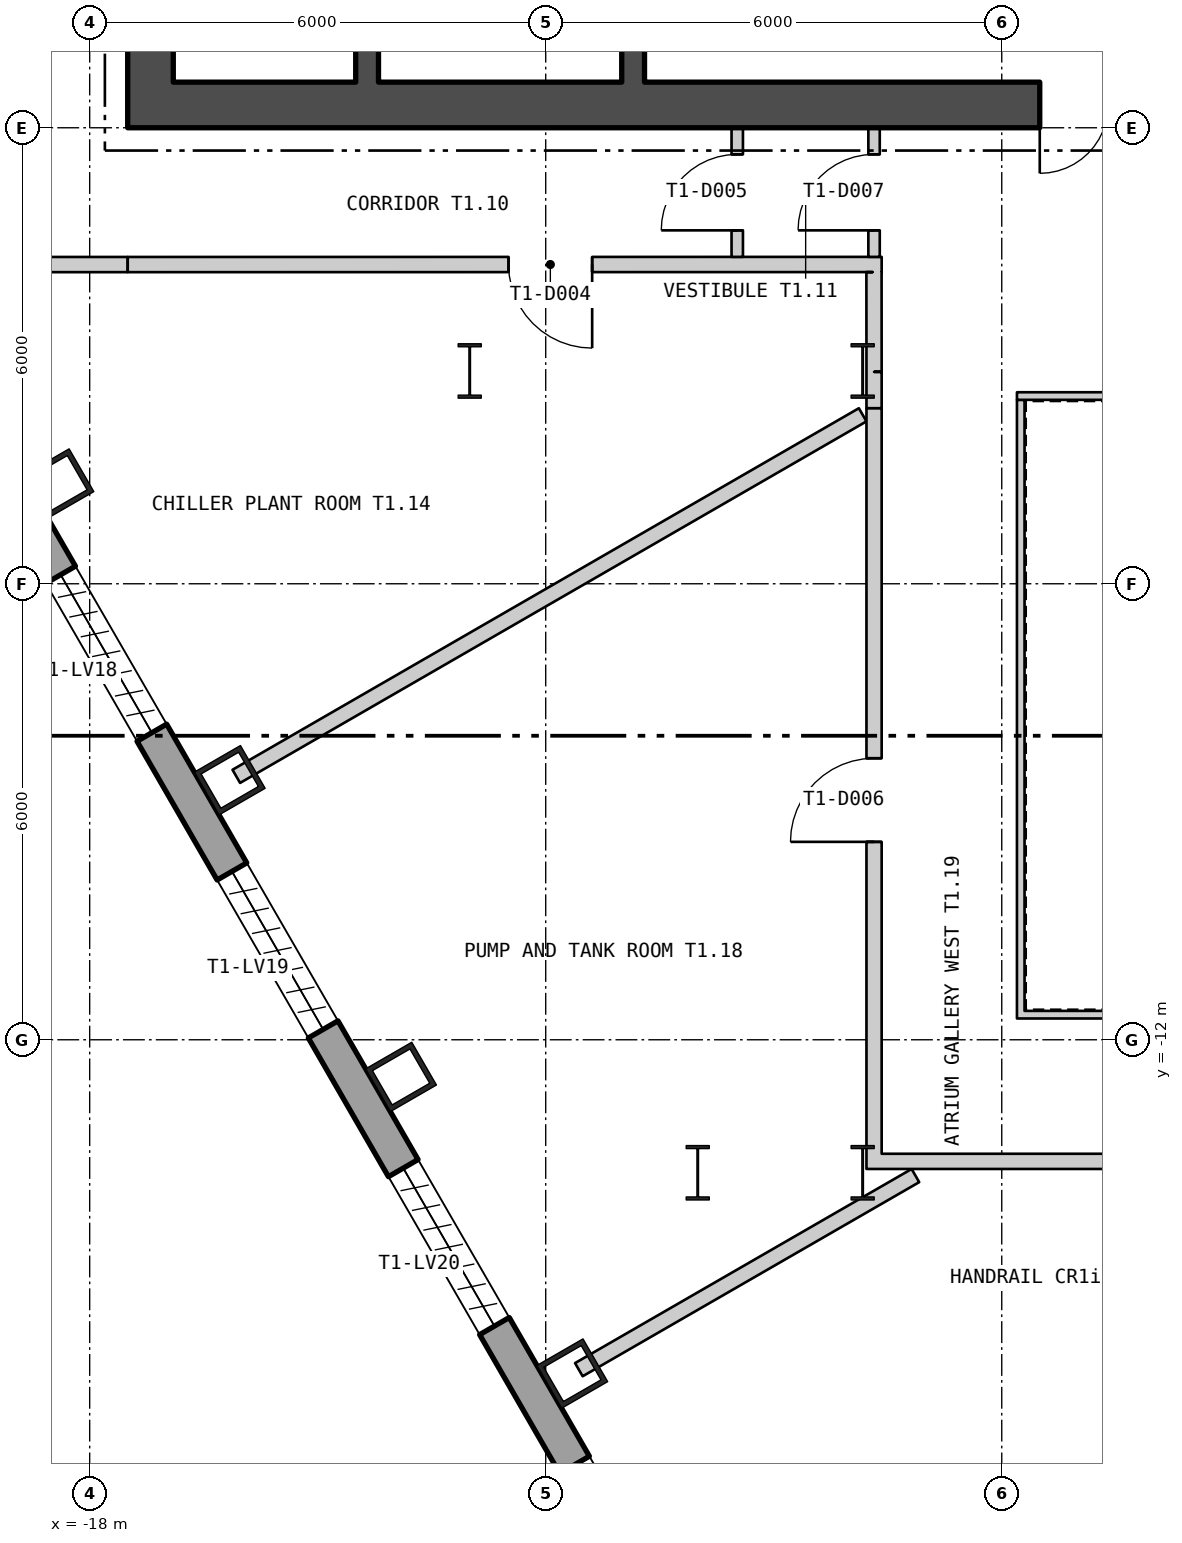
"""IFC4 building model, lengths in metres.
Left out: names, types, materials, properties, quantities, classifications, styles, units other than length and angle.
Written with IfcOpenShell. Run it as: python <this file> out.ifc"""

import sys

from ifc_helpers import new_model, si_unit, direction, frame, frame_2d, origin, origin_2d, place, context, subcontext, project, spatial, polyline, rectangle, hollow_rectangle, i_section, outline, extrude, element, fill, save


model = new_model("IFC4")
c1 = context("Model", 3, precision=1e-05, world=origin(), true_north=direction((0.0, 1.0)))
c2 = subcontext(c1, "Body", "Model", "MODEL_VIEW")
j1 = project(units=[si_unit("LENGTHUNIT", "METRE"), si_unit("PLANEANGLEUNIT", "RADIAN")], contexts=[c1])
p1 = place(None, origin())
s1 = spatial("IfcSite", under=j1, at=p1, CompositionType="ELEMENT")
p2 = place(p1, origin())
s2 = spatial("IfcBuilding", under=s1, at=p2, CompositionType="ELEMENT")
p3 = place(p2, frame((0.0, 0.0, 78.3)))
s3 = spatial("IfcBuildingStorey", under=s2, at=p3, CompositionType="ELEMENT", Elevation=78.3)
for number, where, z_axis, x_axis in (
    (1, (-18.411, -4.681, 0.0), (0.0, 0.0, 1.0), (0.5, -0.866, 0.0)),
    (2, (-16.157, -8.585, 0.0), (0.0, 0.0, 1.0), (0.5, -0.866, 0.0)),
    (3, (-13.903, -12.489, 0.0), (0.0, 0.0, 1.0), (0.5, -0.866, 0.0)),
    (4, (-11.65, -16.392, 0.0), (0.0, 0.0, 1.0), (0.5, -0.866, 0.0)),
):
    element("IfcColumn", number, at=place(p3, frame(where, z_axis=z_axis, x_axis=x_axis)), inside=s3, PredefinedType="COLUMN", context=c2, shape_type="SweptSolid", body=[
        extrude(hollow_rectangle(XDim=0.65, YDim=0.7, WallThickness=0.065, at=origin_2d()), origin(), (0.0, 0.0, 1.0), 6.0),
    ])
for number, where, z_axis, x_axis in (
    (5, (-7.83, -3.2, 0.0), (0.0, 0.0, 1.0), (1.0, 0.0, 0.0)),
    (6, (-7.83, -13.75, 0.0), (0.0, 0.0, 1.0), (1.0, 0.0, 0.0)),
    (7, (-13.0, -3.2, 0.0), (0.0, 0.0, 1.0), (1.0, 0.0, 0.0)),
    (8, (-10.0, -13.75, 0.0), (0.0, 0.0, 1.0), (1.0, 0.0, 0.0)),
):
    element("IfcColumn", number, at=place(p3, frame(where, z_axis=z_axis, x_axis=x_axis)), inside=s3, PredefinedType="COLUMN", context=c2, shape_type="SweptSolid", body=[
        extrude(i_section(OverallWidth=0.304, OverallDepth=0.716, WebThickness=0.021, FlangeThickness=0.04, at=origin_2d()), origin(), (0.0, 0.0, 1.0), 6.0),
    ])
p4 = place(p3, frame((-28.09, 10.934, -0.18), z_axis=(0.0, 0.0, 1.0), x_axis=(0.500000711659, -0.866024992908, 0.0)))
e9 = element("IfcWall", 9, at=p4, inside=s3, PredefinedType="SOLIDWALL", context=c2, shape_type="SweptSolid", body=[
    extrude(outline(polyline([(-0.13, -0.225), (45.87, -0.225), (45.61, 0.225), (0.13, 0.225), (-0.13, -0.225)])), origin(), (0.0, 0.0, 1.0), 6.0),
])
p5 = place(p4, frame((1.424, 0.0, 1.38)))
e10 = element("IfcOpeningElement", 10, at=p5, cuts=e9, PredefinedType="OPENING", context=c2, shape_type="SweptSolid", body=[
    extrude(rectangle(XDim=2.4, YDim=3.6, at=frame_2d((1.2, 1.8))), frame((0.0, 0.235, 0.0), z_axis=(0.0, -1.0, 0.0), x_axis=(1.0, 0.0, 0.0)), (0.0, 0.0, 1.0), 0.47),
])
p6 = place(p4, frame((5.893, 0.0, 1.38)))
e11 = element("IfcOpeningElement", 11, at=p6, cuts=e9, PredefinedType="OPENING", context=c2, shape_type="SweptSolid", body=[
    extrude(rectangle(XDim=2.4, YDim=3.6, at=frame_2d((1.2, 1.8))), frame((0.0, 0.235, 0.0), z_axis=(0.0, -1.0, 0.0), x_axis=(1.0, 0.0, 0.0)), (0.0, 0.0, 1.0), 0.47),
])
p7 = place(p4, frame((10.401, 0.0, 1.38)))
e12 = element("IfcOpeningElement", 12, at=p7, cuts=e9, PredefinedType="OPENING", context=c2, shape_type="SweptSolid", body=[
    extrude(rectangle(XDim=2.4, YDim=3.6, at=frame_2d((1.2, 1.8))), frame((0.0, 0.235, 0.0), z_axis=(0.0, -1.0, 0.0), x_axis=(1.0, 0.0, 0.0)), (0.0, 0.0, 1.0), 0.47),
])
p8 = place(p4, frame((14.909, 0.0, 1.38)))
e13 = element("IfcOpeningElement", 13, at=p8, cuts=e9, PredefinedType="OPENING", context=c2, shape_type="SweptSolid", body=[
    extrude(rectangle(XDim=2.4, YDim=3.6, at=frame_2d((1.2, 1.8))), frame((0.0, 0.235, 0.0), z_axis=(0.0, -1.0, 0.0), x_axis=(1.0, 0.0, 0.0)), (0.0, 0.0, 1.0), 0.47),
])
p9 = place(p4, frame((19.416, 0.0, 1.38)))
e14 = element("IfcOpeningElement", 14, at=p9, cuts=e9, PredefinedType="OPENING", context=c2, shape_type="SweptSolid", body=[
    extrude(rectangle(XDim=2.4, YDim=3.6, at=frame_2d((1.2, 1.8))), frame((0.0, 0.235, 0.0), z_axis=(0.0, -1.0, 0.0), x_axis=(1.0, 0.0, 0.0)), (0.0, 0.0, 1.0), 0.47),
])
p10 = place(p4, frame((23.924, 0.0, 1.38)))
e15 = element("IfcOpeningElement", 15, at=p10, cuts=e9, PredefinedType="OPENING", context=c2, shape_type="SweptSolid", body=[
    extrude(rectangle(XDim=2.4, YDim=3.6, at=frame_2d((1.2, 1.8))), frame((0.0, 0.235, 0.0), z_axis=(0.0, -1.0, 0.0), x_axis=(1.0, 0.0, 0.0)), (0.0, 0.0, 1.0), 0.47),
])
p11 = place(p4, frame((28.431, 0.0, 1.38)))
e16 = element("IfcOpeningElement", 16, at=p11, cuts=e9, PredefinedType="OPENING", context=c2, shape_type="SweptSolid", body=[
    extrude(rectangle(XDim=2.4, YDim=3.6, at=frame_2d((1.2, 1.8))), frame((0.0, 0.235, 0.0), z_axis=(0.0, -1.0, 0.0), x_axis=(1.0, 0.0, 0.0)), (0.0, 0.0, 1.0), 0.47),
])
p12 = place(p4, frame((32.939, 0.0, 1.38)))
e17 = element("IfcOpeningElement", 17, at=p12, cuts=e9, PredefinedType="OPENING", context=c2, shape_type="SweptSolid", body=[
    extrude(rectangle(XDim=2.4, YDim=3.6, at=frame_2d((1.2, 1.8))), frame((0.0, 0.235, 0.0), z_axis=(0.0, -1.0, 0.0), x_axis=(1.0, 0.0, 0.0)), (0.0, 0.0, 1.0), 0.47),
])
p13 = place(p4, frame((37.447, 0.0, 1.38)))
e18 = element("IfcOpeningElement", 18, at=p13, cuts=e9, PredefinedType="OPENING", context=c2, shape_type="SweptSolid", body=[
    extrude(rectangle(XDim=2.4, YDim=3.6, at=frame_2d((1.2, 1.8))), frame((0.0, 0.235, 0.0), z_axis=(0.0, -1.0, 0.0), x_axis=(1.0, 0.0, 0.0)), (0.0, 0.0, 1.0), 0.47),
])
p14 = place(p4, frame((41.916, 0.0, 1.38)))
e19 = element("IfcOpeningElement", 19, at=p14, cuts=e9, PredefinedType="OPENING", context=c2, shape_type="SweptSolid", body=[
    extrude(rectangle(XDim=2.4, YDim=3.6, at=frame_2d((1.2, 1.8))), frame((0.0, 0.235, 0.0), z_axis=(0.0, -1.0, 0.0), x_axis=(1.0, 0.0, 0.0)), (0.0, 0.0, 1.0), 0.47),
])
for number, where, z_axis, x_axis in (
    (20, (-5.8, -11.67, 0.0), (0.0, 0.0, 1.0), (1.0, 0.0, 0.0)),
    (21, (5.8, -3.53, 0.0), (0.0, 0.0, 1.0), (-1.0, 0.0, 0.0)),
):
    element("IfcWall", number, at=place(p3, frame(where, z_axis=z_axis, x_axis=x_axis)), inside=s3, PredefinedType="PARTITIONING", context=c2, shape_type="SweptSolid", body=[
        extrude(rectangle(XDim=11.6, YDim=0.1, at=frame_2d((5.8, 0.0))), origin(), (0.0, 0.0, 1.0), 5.8),
    ])
p15 = place(p3, frame((-5.75, -3.58, 0.0), z_axis=(0.0, 0.0, 1.0), x_axis=(0.0, -1.0, 0.0)))
e22 = element("IfcWall", 22, at=p15, inside=s3, PredefinedType="PARTITIONING", context=c2, shape_type="SweptSolid", body=[
    extrude(rectangle(XDim=8.04, YDim=0.1, at=frame_2d((4.02, 0.0))), origin(), (0.0, 0.0, 1.0), 5.8),
])
p16 = place(p3, frame((-17.5, 0.3, 0.0), z_axis=(0.0, 0.0, 1.0), x_axis=(1.0, 0.0, 0.0)))
e23 = element("IfcWall", 23, at=p16, inside=s3, PredefinedType="SHEAR", context=c2, shape_type="SweptSolid", body=[
    extrude(rectangle(XDim=35.0, YDim=0.6, at=frame_2d((17.5, 0.0))), origin(), (0.0, 0.0, 1.0), 5.8),
])
p17 = place(p16, frame((12.0, 0.0, 0.0)))
e24 = element("IfcOpeningElement", 24, at=p17, cuts=e23, PredefinedType="OPENING", context=c2, shape_type="SweptSolid", body=[
    extrude(rectangle(XDim=1.8, YDim=2.4, at=frame_2d((0.9, 1.2))), frame((0.0, 0.31, 0.0), z_axis=(0.0, -1.0, 0.0), x_axis=(1.0, 0.0, 0.0)), (0.0, 0.0, 1.0), 0.62),
])
p18 = place(p16, frame((22.0, 0.0, 0.0)))
e25 = element("IfcOpeningElement", 25, at=p18, cuts=e23, PredefinedType="OPENING", context=c2, shape_type="SweptSolid", body=[
    extrude(rectangle(XDim=1.8, YDim=2.4, at=frame_2d((0.9, 1.2))), frame((0.0, 0.31, 0.0), z_axis=(0.0, -1.0, 0.0), x_axis=(1.0, 0.0, 0.0)), (0.0, 0.0, 1.0), 0.62),
])
p19 = place(p3, frame((-17.2, 0.6, 0.0), z_axis=(0.0, 0.0, 1.0), x_axis=(0.0, 1.0, 0.0)))
e26 = element("IfcWall", 26, at=p19, inside=s3, PredefinedType="SHEAR", context=c2, shape_type="SweptSolid", body=[
    extrude(rectangle(XDim=16.8, YDim=0.6, at=frame_2d((8.4, 0.0))), origin(), (0.0, 0.0, 1.0), 5.8),
])
p20 = place(p19, frame((5.7, 0.0, 0.0)))
e27 = element("IfcOpeningElement", 27, at=p20, cuts=e26, PredefinedType="OPENING", context=c2, shape_type="SweptSolid", body=[
    extrude(rectangle(XDim=1.5, YDim=2.1, at=frame_2d((0.75, 1.05))), frame((0.0, 0.31, 0.0), z_axis=(0.0, -1.0, 0.0), x_axis=(1.0, 0.0, 0.0)), (0.0, 0.0, 1.0), 0.62),
])
p21 = place(p19, frame((0.571, 0.0, 0.0)))
e28 = element("IfcOpeningElement", 28, at=p21, cuts=e26, PredefinedType="OPENING", context=c2, shape_type="SweptSolid", body=[
    extrude(rectangle(XDim=0.9, YDim=2.1, at=frame_2d((0.45, 1.05))), frame((0.0, 0.31, 0.0), z_axis=(0.0, -1.0, 0.0), x_axis=(1.0, 0.0, 0.0)), (0.0, 0.0, 1.0), 0.62),
])
p22 = place(p19, frame((3.421, 0.0, 0.0)))
e29 = element("IfcOpeningElement", 29, at=p22, cuts=e26, PredefinedType="OPENING", context=c2, shape_type="SweptSolid", body=[
    extrude(rectangle(XDim=0.9, YDim=2.1, at=frame_2d((0.45, 1.05))), frame((0.0, 0.31, 0.0), z_axis=(0.0, -1.0, 0.0), x_axis=(1.0, 0.0, 0.0)), (0.0, 0.0, 1.0), 0.62),
])
p23 = place(p19, frame((9.473, 0.0, 0.0)))
e30 = element("IfcOpeningElement", 30, at=p23, cuts=e26, PredefinedType="OPENING", context=c2, shape_type="SweptSolid", body=[
    extrude(rectangle(XDim=1.0, YDim=2.1, at=frame_2d((0.5, 1.05))), frame((0.0, 0.31, 0.0), z_axis=(0.0, -1.0, 0.0), x_axis=(1.0, 0.0, 0.0)), (0.0, 0.0, 1.0), 0.62),
])
p24 = place(p19, frame((14.323, 0.0, 0.0)))
e31 = element("IfcOpeningElement", 31, at=p24, cuts=e26, PredefinedType="OPENING", context=c2, shape_type="SweptSolid", body=[
    extrude(rectangle(XDim=0.9, YDim=2.1, at=frame_2d((0.45, 1.05))), frame((0.0, 0.31, 0.0), z_axis=(0.0, -1.0, 0.0), x_axis=(1.0, 0.0, 0.0)), (0.0, 0.0, 1.0), 0.62),
])
p25 = place(p3, frame((-10.85, 0.6, 0.0), z_axis=(0.0, 0.0, 1.0), x_axis=(0.0, 1.0, 0.0)))
e32 = element("IfcWall", 32, at=p25, inside=s3, PredefinedType="SHEAR", context=c2, shape_type="SweptSolid", body=[
    extrude(rectangle(XDim=16.8, YDim=0.3, at=frame_2d((8.4, 0.0))), origin(), (0.0, 0.0, 1.0), 5.8),
])
p26 = place(p25, frame((5.075, 0.0, 0.0)))
e33 = element("IfcOpeningElement", 33, at=p26, cuts=e32, PredefinedType="OPENING", context=c2, shape_type="SweptSolid", body=[
    extrude(rectangle(XDim=1.25, YDim=2.1, at=frame_2d((0.625, 1.05))), frame((0.0, 0.16, 0.0), z_axis=(0.0, -1.0, 0.0), x_axis=(1.0, 0.0, 0.0)), (0.0, 0.0, 1.0), 0.32),
])
p27 = place(p25, frame((1.525, 0.0, 0.0)))
e34 = element("IfcOpeningElement", 34, at=p27, cuts=e32, PredefinedType="OPENING", context=c2, shape_type="SweptSolid", body=[
    extrude(rectangle(XDim=1.0, YDim=2.1, at=frame_2d((0.5, 1.05))), frame((0.0, 0.16, 0.0), z_axis=(0.0, -1.0, 0.0), x_axis=(1.0, 0.0, 0.0)), (0.0, 0.0, 1.0), 0.32),
])
p28 = place(p3, frame((-14.35, 0.6, 0.0), z_axis=(0.0, 0.0, 1.0), x_axis=(0.0, 1.0, 0.0)))
e35 = element("IfcWall", 35, at=p28, inside=s3, PredefinedType="SHEAR", context=c2, shape_type="SweptSolid", body=[
    extrude(rectangle(XDim=16.8, YDim=0.3, at=frame_2d((8.4, 0.0))), origin(), (0.0, 0.0, 1.0), 5.8),
])
p29 = place(p28, frame((5.7, 0.0, 0.0)))
e36 = element("IfcOpeningElement", 36, at=p29, cuts=e35, PredefinedType="OPENING", context=c2, shape_type="SweptSolid", body=[
    extrude(rectangle(XDim=1.5, YDim=2.1, at=frame_2d((0.75, 1.05))), frame((0.0, 0.16, 0.0), z_axis=(0.0, -1.0, 0.0), x_axis=(1.0, 0.0, 0.0)), (0.0, 0.0, 1.0), 0.32),
])
p30 = place(p3, frame((-19.2, -1.8, 0.0), z_axis=(0.0, 0.0, 1.0), x_axis=(1.0, 0.0, 0.0)))
e37 = element("IfcWall", 37, at=p30, inside=s3, PredefinedType="PARTITIONING", context=c2, shape_type="SweptSolid", body=[
    extrude(rectangle(XDim=1.699, YDim=0.2, at=frame_2d((0.85, 0.0))), origin(), (0.0, 0.0, 1.0), 5.8),
])
p31 = place(p3, frame((-17.499, -1.8, 0.0), z_axis=(0.0, 0.0, 1.0), x_axis=(0.999999994918, 0.000100816614, 0.0)))
e38 = element("IfcWall", 38, at=p31, inside=s3, PredefinedType="PARTITIONING", context=c2, shape_type="SweptSolid", body=[
    extrude(rectangle(XDim=9.919, YDim=0.2, at=frame_2d((4.96, 0.0))), origin(), (0.0, 0.0, 1.0), 5.8),
])
p32 = place(p31, frame((5.01, 0.0, 0.0)))
e39 = element("IfcOpeningElement", 39, at=p32, cuts=e38, PredefinedType="OPENING", context=c2, shape_type="SweptSolid", body=[
    extrude(rectangle(XDim=1.1, YDim=2.1, at=frame_2d((0.55, 1.05))), frame((0.0, 0.11, 0.0), z_axis=(0.0, -1.0, 0.0), x_axis=(1.0, 0.0, 0.0)), (0.0, 0.0, 1.0), 0.22),
])
p33 = place(p3, frame((-16.071, -8.534, 0.0), z_axis=(0.0, 0.0, 1.0), x_axis=(0.866068339032, 0.499925626596, 0.0)))
e40 = element("IfcWall", 40, at=p33, inside=s3, PredefinedType="PARTITIONING", context=c2, shape_type="SweptSolid", body=[
    extrude(rectangle(XDim=9.515, YDim=0.2, at=frame_2d((4.758, 0.0))), origin(), (0.0, 0.0, 1.0), 5.8),
])
p34 = place(p3, frame((-11.564, -16.341, 0.0), z_axis=(0.0, 0.0, 1.0), x_axis=(0.86623769072, 0.499632127845, 0.0)))
e41 = element("IfcWall", 41, at=p34, inside=s3, PredefinedType="PARTITIONING", context=c2, shape_type="SweptSolid", body=[
    extrude(rectangle(XDim=5.112, YDim=0.2, at=frame_2d((2.556, 0.0))), origin(), (0.0, 0.0, 1.0), 5.8),
])
p35 = place(p3, frame((-9.48, -1.699, 0.0), z_axis=(0.0, 0.0, 1.0), x_axis=(0.0, 1.0, 0.0)))
e42 = element("IfcWall", 42, at=p35, inside=s3, PredefinedType="PARTITIONING", context=c2, shape_type="SweptSolid", body=[
    extrude(rectangle(XDim=1.698, YDim=0.15, at=frame_2d((0.849, 0.0))), origin(), (0.0, 0.0, 1.0), 5.2),
])
p36 = place(p35, frame((0.349, 0.0, 0.0)))
e43 = element("IfcOpeningElement", 43, at=p36, cuts=e42, PredefinedType="OPENING", context=c2, shape_type="SweptSolid", body=[
    extrude(rectangle(XDim=1.0, YDim=2.1, at=frame_2d((0.5, 1.05))), frame((0.0, 0.085, 0.0), z_axis=(0.0, -1.0, 0.0), x_axis=(1.0, 0.0, 0.0)), (0.0, 0.0, 1.0), 0.17),
])
p37 = place(p3, frame((-7.681, -1.899, 0.0), z_axis=(0.0, 0.0, 1.0), x_axis=(0.000761614402, -0.999999709972, 0.0)))
e44 = element("IfcWall", 44, at=p37, inside=s3, PredefinedType="PARTITIONING", context=c2, shape_type="SweptSolid", body=[
    extrude(rectangle(XDim=1.313, YDim=0.2, at=frame_2d((0.656, 0.0))), origin(), (0.0, 0.0, 1.0), 5.8),
])
p38 = place(p3, frame((-7.68, -13.7, 0.0), z_axis=(0.0, 0.0, 1.0), x_axis=(0.0, 1.0, 0.0)))
e45 = element("IfcWall", 45, at=p38, inside=s3, PredefinedType="PARTITIONING", context=c2, shape_type="SweptSolid", body=[
    extrude(rectangle(XDim=10.008, YDim=0.2, at=frame_2d((5.004, 0.0))), origin(), (0.0, 0.0, 1.0), 5.2),
])
p39 = place(p38, frame((4.304, 0.0, 0.0)))
e46 = element("IfcOpeningElement", 46, at=p39, cuts=e45, PredefinedType="OPENING", context=c2, shape_type="SweptSolid", body=[
    extrude(rectangle(XDim=1.1, YDim=2.1, at=frame_2d((0.55, 1.05))), frame((0.0, 0.11, 0.0), z_axis=(0.0, -1.0, 0.0), x_axis=(1.0, 0.0, 0.0)), (0.0, 0.0, 1.0), 0.22),
])
p40 = place(p3, frame((-7.68, -3.69, 0.0), z_axis=(0.0, 0.0, 1.0), x_axis=(0.0, 1.0, 0.0)))
e47 = element("IfcWall", 47, at=p40, inside=s3, PredefinedType="PARTITIONING", context=c2, shape_type="SweptSolid", body=[
    extrude(rectangle(XDim=0.478, YDim=0.2, at=frame_2d((0.239, 0.0))), origin(), (0.0, 0.0, 1.0), 5.2),
])
p41 = place(p3, frame((-7.68, -1.699, 0.0), z_axis=(0.0, 0.0, 1.0), x_axis=(0.0, 1.0, 0.0)))
e48 = element("IfcWall", 48, at=p41, inside=s3, PredefinedType="PARTITIONING", context=c2, shape_type="SweptSolid", body=[
    extrude(rectangle(XDim=1.698, YDim=0.15, at=frame_2d((0.849, 0.0))), origin(), (0.0, 0.0, 1.0), 5.8),
])
p42 = place(p41, frame((0.349, 0.0, 0.0)))
e49 = element("IfcOpeningElement", 49, at=p42, cuts=e48, PredefinedType="OPENING", context=c2, shape_type="SweptSolid", body=[
    extrude(rectangle(XDim=1.0, YDim=2.1, at=frame_2d((0.5, 1.05))), frame((0.0, 0.085, 0.0), z_axis=(0.0, -1.0, 0.0), x_axis=(1.0, 0.0, 0.0)), (0.0, 0.0, 1.0), 0.17),
])
p43 = place(p3, frame((-7.58, -13.6, 0.0), z_axis=(0.0, 0.0, 1.0), x_axis=(1.0, 0.0, 0.0)))
e50 = element("IfcWall", 50, at=p43, inside=s3, PredefinedType="PARTITIONING", context=c2, shape_type="SweptSolid", body=[
    extrude(rectangle(XDim=5.88, YDim=0.2, at=frame_2d((2.94, 0.0))), origin(), (0.0, 0.0, 1.0), 4.89),
])
p44 = place(p43, frame((3.309, 0.0, 0.0)))
e51 = element("IfcOpeningElement", 51, at=p44, cuts=e50, PredefinedType="OPENING", context=c2, shape_type="SweptSolid", body=[
    extrude(rectangle(XDim=1.1, YDim=2.1, at=frame_2d((0.55, 1.05))), frame((0.0, 0.11, 0.0), z_axis=(0.0, -1.0, 0.0), x_axis=(1.0, 0.0, 0.0)), (0.0, 0.0, 1.0), 0.22),
])
p45 = place(p17, origin())
e52 = element("IfcDoor", 52, at=p45, inside=s3, OperationType="DOUBLE_DOOR_SINGLE_SWING", PredefinedType="DOOR", context=c2, shape_type="SweptSolid", body=[
    extrude(rectangle(XDim=1.8, YDim=2.4, at=frame_2d((0.9, 1.2))), frame((0.0, 0.025, 0.0), z_axis=(0.0, -1.0, 0.0), x_axis=(1.0, 0.0, 0.0)), (0.0, 0.0, 1.0), 0.05),
])
fill(e24, e52)
p46 = place(p32, origin())
e53 = element("IfcDoor", 53, at=p46, inside=s3, OperationType="SINGLE_SWING_RIGHT", PredefinedType="DOOR", context=c2, shape_type="SweptSolid", body=[
    extrude(rectangle(XDim=1.1, YDim=2.1, at=frame_2d((0.55, 1.05))), frame((0.0, 0.025, 0.0), z_axis=(0.0, -1.0, 0.0), x_axis=(1.0, 0.0, 0.0)), (0.0, 0.0, 1.0), 0.05),
])
fill(e39, e53)
p47 = place(p36, origin())
e54 = element("IfcDoor", 54, at=p47, inside=s3, OperationType="SINGLE_SWING_RIGHT", PredefinedType="DOOR", context=c2, shape_type="SweptSolid", body=[
    extrude(rectangle(XDim=1.0, YDim=2.1, at=frame_2d((0.5, 1.05))), frame((0.0, 0.025, 0.0), z_axis=(0.0, -1.0, 0.0), x_axis=(1.0, 0.0, 0.0)), (0.0, 0.0, 1.0), 0.05),
])
fill(e43, e54)
p48 = place(p39, origin())
e55 = element("IfcDoor", 55, at=p48, inside=s3, OperationType="SINGLE_SWING_RIGHT", PredefinedType="DOOR", context=c2, shape_type="SweptSolid", body=[
    extrude(rectangle(XDim=1.1, YDim=2.1, at=frame_2d((0.55, 1.05))), frame((0.0, 0.025, 0.0), z_axis=(0.0, -1.0, 0.0), x_axis=(1.0, 0.0, 0.0)), (0.0, 0.0, 1.0), 0.05),
])
fill(e46, e55)
p49 = place(p42, origin())
e56 = element("IfcDoor", 56, at=p49, inside=s3, OperationType="SINGLE_SWING_RIGHT", PredefinedType="DOOR", context=c2, shape_type="SweptSolid", body=[
    extrude(rectangle(XDim=1.0, YDim=2.1, at=frame_2d((0.5, 1.05))), frame((0.0, 0.025, 0.0), z_axis=(0.0, -1.0, 0.0), x_axis=(1.0, 0.0, 0.0)), (0.0, 0.0, 1.0), 0.05),
])
fill(e49, e56)
save(model, sys.argv[1])
